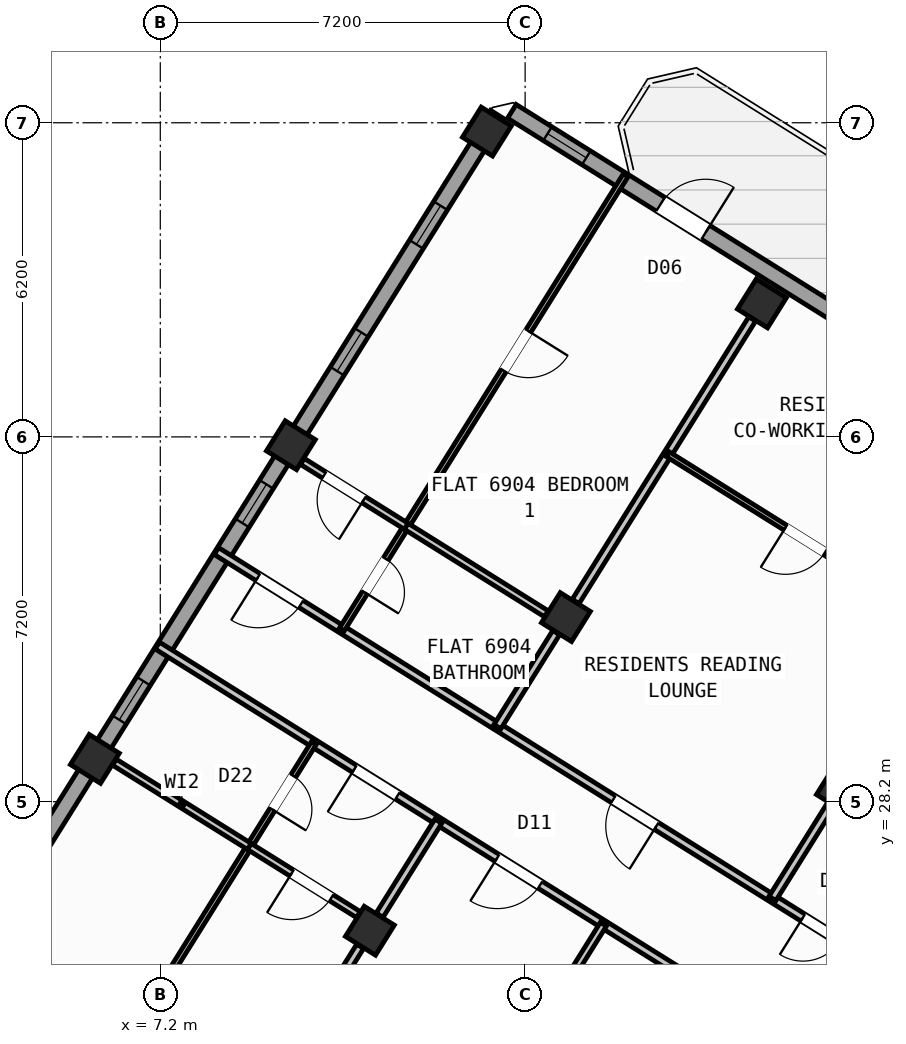
"""IFC4 building model, lengths in metres.
Left out: names, types, materials, properties, quantities, classifications, styles, units other than length and angle.
Written with IfcOpenShell. Run it as: python <this file> out.ifc"""

import sys

from ifc_helpers import new_model, si_unit, direction, frame, frame_2d, origin, origin_2d, place, context, subcontext, project, spatial, rectangle, hollow_rectangle, extrude, source, transform, mapped, element, fill, save


model = new_model("IFC4")
c1 = context("Model", 3, precision=1e-05, world=origin(), true_north=direction((0.0, 1.0)))
c2 = subcontext(c1, "Body", "Model", "MODEL_VIEW")
j1 = project(units=[si_unit("LENGTHUNIT", "METRE"), si_unit("PLANEANGLEUNIT", "RADIAN")], contexts=[c1])
p1 = place(None, origin())
s1 = spatial("IfcSite", under=j1, at=p1, CompositionType="ELEMENT")
p2 = place(p1, origin())
s2 = spatial("IfcBuilding", under=s1, at=p2, CompositionType="ELEMENT")
p3 = place(p2, frame((0.0, 0.0, 273.6)))
s3 = spatial("IfcBuildingStorey", under=s2, at=p3, CompositionType="ELEMENT", Elevation=273.6)
m1 = source(origin(), c2, "Body", "SweptSolid", [
    extrude(hollow_rectangle(XDim=0.7, YDim=0.7, WallThickness=0.028, at=origin_2d()), origin(), (0.0, 0.0, 1.0), 3.6),
])
for number, where, z_axis, x_axis in (
    (1, (20.632, 28.452, 0.0), (0.0, 0.0, 1.0), (-0.848, 0.53, 0.0)),
    (2, (19.073, 38.034, 0.0), (0.0, 0.0, 1.0), (-0.848, 0.53, 0.0)),
    (3, (15.205, 31.844, 0.0), (0.0, 0.0, 1.0), (-0.848, 0.53, 0.0)),
    (4, (11.336, 25.653, 0.0), (0.0, 0.0, 1.0), (-0.848, 0.53, 0.0)),
    (5, (13.646, 41.426, 0.0), (0.0, 0.0, 1.0), (-0.848, 0.53, 0.0)),
    (6, (9.777, 35.235, 0.0), (0.0, 0.0, 1.0), (-0.848, 0.53, 0.0)),
    (7, (5.909, 29.044, 0.0), (0.0, 0.0, 1.0), (-0.848, 0.53, 0.0)),
):
    element("IfcColumn", number, at=place(p3, frame(where, z_axis=z_axis, x_axis=x_axis)), inside=s3, PredefinedType="COLUMN", context=c2, shape_type="MappedRepresentation", body=[
        mapped(m1, transform((0.0, 0.0, 0.0), scale=1.0)),
    ])
p4 = place(p3, frame((2.415, 23.452, 0.0), z_axis=(0.0, 0.0, 1.0), x_axis=(0.52991049553, 0.848053575387, 0.0)))
e8 = element("IfcWall", 8, at=p4, inside=s3, PredefinedType="STANDARD", context=c2, shape_type="SweptSolid", body=[
    extrude(rectangle(XDim=21.587, YDim=0.32, at=frame_2d((10.794, 0.0))), origin(), (0.0, 0.0, 1.0), 2.875),
])
p5 = place(p4, frame((2.606, 0.0, 0.9)))
e9 = element("IfcOpeningElement", 9, at=p5, cuts=e8, PredefinedType="OPENING", context=c2, shape_type="SweptSolid", body=[
    extrude(rectangle(XDim=1.65, YDim=1.45, at=frame_2d((0.825, 0.725))), frame((0.0, 0.17, 0.0), z_axis=(0.0, -1.0, 0.0), x_axis=(1.0, 0.0, 0.0)), (0.0, 0.0, 1.0), 0.34),
])
p6 = place(p4, frame((7.504, 0.0, 1.0)))
e10 = element("IfcOpeningElement", 10, at=p6, cuts=e8, PredefinedType="OPENING", context=c2, shape_type="SweptSolid", body=[
    extrude(rectangle(XDim=0.9, YDim=1.25, at=frame_2d((0.45, 0.625))), frame((0.0, 0.17, 0.0), z_axis=(0.0, -1.0, 0.0), x_axis=(1.0, 0.0, 0.0)), (0.0, 0.0, 1.0), 0.34),
])
p7 = place(p4, frame((12.084, 0.0, 1.0)))
e11 = element("IfcOpeningElement", 11, at=p7, cuts=e8, PredefinedType="OPENING", context=c2, shape_type="SweptSolid", body=[
    extrude(rectangle(XDim=0.9, YDim=1.25, at=frame_2d((0.45, 0.625))), frame((0.0, 0.17, 0.0), z_axis=(0.0, -1.0, 0.0), x_axis=(1.0, 0.0, 0.0)), (0.0, 0.0, 1.0), 0.34),
])
p8 = place(p4, frame((15.619, 0.0, 1.0)))
e12 = element("IfcOpeningElement", 12, at=p8, cuts=e8, PredefinedType="OPENING", context=c2, shape_type="SweptSolid", body=[
    extrude(rectangle(XDim=0.9, YDim=1.25, at=frame_2d((0.45, 0.625))), frame((0.0, 0.17, 0.0), z_axis=(0.0, -1.0, 0.0), x_axis=(1.0, 0.0, 0.0)), (0.0, 0.0, 1.0), 0.34),
])
p9 = place(p4, frame((18.569, 0.0, 1.0)))
e13 = element("IfcOpeningElement", 13, at=p9, cuts=e8, PredefinedType="OPENING", context=c2, shape_type="SweptSolid", body=[
    extrude(rectangle(XDim=0.9, YDim=1.25, at=frame_2d((0.45, 0.625))), frame((0.0, 0.17, 0.0), z_axis=(0.0, -1.0, 0.0), x_axis=(1.0, 0.0, 0.0)), (0.0, 0.0, 1.0), 0.34),
])
p10 = place(p3, frame((14.138, 41.825, 0.0), z_axis=(0.0, 0.0, 1.0), x_axis=(0.848046498049, -0.529921821731, 0.0)))
e14 = element("IfcWall", 14, at=p10, inside=s3, PredefinedType="STANDARD", context=c2, shape_type="SweptSolid", body=[
    extrude(rectangle(XDim=31.588, YDim=0.32, at=frame_2d((15.794, 0.0))), origin(), (0.0, 0.0, 1.0), 3.35),
])
p11 = place(p10, frame((3.46, 0.0, 0.0)))
e15 = element("IfcOpeningElement", 15, at=p11, cuts=e14, PredefinedType="OPENING", context=c2, shape_type="SweptSolid", body=[
    extrude(rectangle(XDim=1.05, YDim=2.15, at=frame_2d((0.525, 1.075))), frame((0.0, 0.17, 0.0), z_axis=(0.0, -1.0, 0.0), x_axis=(1.0, 0.0, 0.0)), (0.0, 0.0, 1.0), 0.34),
])
p12 = place(p10, frame((0.831, 0.0, 1.0)))
e16 = element("IfcOpeningElement", 16, at=p12, cuts=e14, PredefinedType="OPENING", context=c2, shape_type="SweptSolid", body=[
    extrude(rectangle(XDim=0.9, YDim=1.25, at=frame_2d((0.45, 0.625))), frame((0.0, 0.17, 0.0), z_axis=(0.0, -1.0, 0.0), x_axis=(1.0, 0.0, 0.0)), (0.0, 0.0, 1.0), 0.34),
])
p13 = place(p10, frame((8.719, 0.0, 0.9)))
e17 = element("IfcOpeningElement", 17, at=p13, cuts=e14, PredefinedType="OPENING", context=c2, shape_type="SweptSolid", body=[
    extrude(rectangle(XDim=1.35, YDim=1.45, at=frame_2d((0.675, 0.725))), frame((0.0, 0.17, 0.0), z_axis=(0.0, -1.0, 0.0), x_axis=(1.0, 0.0, 0.0)), (0.0, 0.0, 1.0), 0.34),
])
p14 = place(p10, frame((13.599, 0.0, 0.95)))
e18 = element("IfcOpeningElement", 18, at=p14, cuts=e14, PredefinedType="OPENING", context=c2, shape_type="SweptSolid", body=[
    extrude(rectangle(XDim=1.95, YDim=1.35, at=frame_2d((0.975, 0.675))), frame((0.0, 0.17, 0.0), z_axis=(0.0, -1.0, 0.0), x_axis=(1.0, 0.0, 0.0)), (0.0, 0.0, 1.0), 0.34),
])
p15 = place(p10, frame((17.154, 0.0, 1.0)))
e19 = element("IfcOpeningElement", 19, at=p15, cuts=e14, PredefinedType="OPENING", context=c2, shape_type="SweptSolid", body=[
    extrude(rectangle(XDim=0.9, YDim=1.25, at=frame_2d((0.45, 0.625))), frame((0.0, 0.17, 0.0), z_axis=(0.0, -1.0, 0.0), x_axis=(1.0, 0.0, 0.0)), (0.0, 0.0, 1.0), 0.34),
])
p16 = place(p10, frame((21.719, 0.0, 0.9)))
e20 = element("IfcOpeningElement", 20, at=p16, cuts=e14, PredefinedType="OPENING", context=c2, shape_type="SweptSolid", body=[
    extrude(rectangle(XDim=1.65, YDim=1.45, at=frame_2d((0.825, 0.725))), frame((0.0, 0.17, 0.0), z_axis=(0.0, -1.0, 0.0), x_axis=(1.0, 0.0, 0.0)), (0.0, 0.0, 1.0), 0.34),
])
p17 = place(p10, frame((27.419, 0.0, 0.9)))
e21 = element("IfcOpeningElement", 21, at=p17, cuts=e14, PredefinedType="OPENING", context=c2, shape_type="SweptSolid", body=[
    extrude(rectangle(XDim=1.65, YDim=1.45, at=frame_2d((0.825, 0.725))), frame((0.0, 0.17, 0.0), z_axis=(0.0, -1.0, 0.0), x_axis=(1.0, 0.0, 0.0)), (0.0, 0.0, 1.0), 0.34),
])
p18 = place(p3, frame((22.495, 24.281, 0.0), z_axis=(0.0, 0.0, 1.0), x_axis=(-0.848052408131, 0.529912363569, 0.0)))
e22 = element("IfcWall", 22, at=p18, inside=s3, PredefinedType="PARTITIONING", context=c2, shape_type="SweptSolid", body=[
    extrude(rectangle(XDim=16.73, YDim=0.16, at=frame_2d((8.365, 0.0))), origin(), (0.0, 0.0, 1.0), 3.34),
])
p19 = place(p18, frame((2.22, 0.0, 0.0)))
e23 = element("IfcOpeningElement", 23, at=p19, cuts=e22, PredefinedType="OPENING", context=c2, shape_type="SweptSolid", body=[
    extrude(rectangle(XDim=0.86, YDim=2.05, at=frame_2d((0.43, 1.025))), frame((0.0, 0.09, 0.0), z_axis=(0.0, -1.0, 0.0), x_axis=(1.0, 0.0, 0.0)), (0.0, 0.0, 1.0), 0.18),
])
p20 = place(p18, frame((6.49, 0.0, 0.0)))
e24 = element("IfcOpeningElement", 24, at=p20, cuts=e22, PredefinedType="OPENING", context=c2, shape_type="SweptSolid", body=[
    extrude(rectangle(XDim=1.0, YDim=2.1, at=frame_2d((0.5, 1.05))), frame((0.0, 0.09, 0.0), z_axis=(0.0, -1.0, 0.0), x_axis=(1.0, 0.0, 0.0)), (0.0, 0.0, 1.0), 0.18),
])
p21 = place(p18, frame((14.76, 0.0, 0.0)))
e25 = element("IfcOpeningElement", 25, at=p21, cuts=e22, PredefinedType="OPENING", context=c2, shape_type="SweptSolid", body=[
    extrude(rectangle(XDim=1.0, YDim=2.1, at=frame_2d((0.5, 1.05))), frame((0.0, 0.09, 0.0), z_axis=(0.0, -1.0, 0.0), x_axis=(1.0, 0.0, 0.0)), (0.0, 0.0, 1.0), 0.18),
])
p22 = place(p3, frame((21.329, 22.416, 0.0), z_axis=(0.0, 0.0, 1.0), x_axis=(-0.848052408131, 0.529912363569, 0.0)))
e26 = element("IfcWall", 26, at=p22, inside=s3, PredefinedType="PARTITIONING", context=c2, shape_type="SweptSolid", body=[
    extrude(rectangle(XDim=16.73, YDim=0.16, at=frame_2d((8.365, 0.0))), origin(), (0.0, 0.0, 1.0), 3.34),
])
p23 = place(p22, frame((1.395, 0.0, 0.0)))
e27 = element("IfcOpeningElement", 27, at=p23, cuts=e26, PredefinedType="OPENING", context=c2, shape_type="SweptSolid", body=[
    extrude(rectangle(XDim=1.0, YDim=2.1, at=frame_2d((0.5, 1.05))), frame((0.0, 0.09, 0.0), z_axis=(0.0, -1.0, 0.0), x_axis=(1.0, 0.0, 0.0)), (0.0, 0.0, 1.0), 0.18),
])
p24 = place(p22, frame((7.82, 0.0, 0.0)))
e28 = element("IfcOpeningElement", 28, at=p24, cuts=e26, PredefinedType="OPENING", context=c2, shape_type="SweptSolid", body=[
    extrude(rectangle(XDim=1.0, YDim=2.1, at=frame_2d((0.5, 1.05))), frame((0.0, 0.09, 0.0), z_axis=(0.0, -1.0, 0.0), x_axis=(1.0, 0.0, 0.0)), (0.0, 0.0, 1.0), 0.18),
])
p25 = place(p22, frame((11.14, 0.0, 0.0)))
e29 = element("IfcOpeningElement", 29, at=p25, cuts=e26, PredefinedType="OPENING", context=c2, shape_type="SweptSolid", body=[
    extrude(rectangle(XDim=1.0, YDim=2.1, at=frame_2d((0.5, 1.05))), frame((0.0, 0.09, 0.0), z_axis=(0.0, -1.0, 0.0), x_axis=(1.0, 0.0, 0.0)), (0.0, 0.0, 1.0), 0.18),
])
p26 = place(p3, frame((12.688, 27.815, 0.0), z_axis=(0.0, 0.0, 1.0), x_axis=(-0.52994879608, -0.848029641896, 0.0)))
e30 = element("IfcWall", 30, at=p26, inside=s3, PredefinedType="PARTITIONING", context=c2, shape_type="SweptSolid", body=[
    extrude(rectangle(XDim=2.188, YDim=0.16, at=frame_2d((1.094, 0.0))), origin(), (0.0, 0.0, 1.0), 2.875),
])
p27 = place(p3, frame((11.144, 25.346, 0.0), z_axis=(0.0, 0.0, 1.0), x_axis=(-0.529904903214, -0.848057069748, 0.0)))
e31 = element("IfcWall", 31, at=p27, inside=s3, PredefinedType="PARTITIONING", context=c2, shape_type="SweptSolid", body=[
    extrude(rectangle(XDim=5.601, YDim=0.16, at=frame_2d((2.801, 0.0))), origin(), (0.0, 0.0, 1.0), 2.875),
])
p28 = place(p3, frame((15.944, 25.781, 0.0), z_axis=(0.0, 0.0, 1.0), x_axis=(-0.529917480809, -0.848049210561, 0.0)))
e32 = element("IfcWall", 32, at=p28, inside=s3, PredefinedType="PLUMBINGWALL", context=c2, shape_type="SweptSolid", body=[
    extrude(rectangle(XDim=4.58, YDim=0.14, at=frame_2d((2.29, 0.0))), origin(), (0.0, 0.0, 1.0), 3.34),
])
p29 = place(p28, frame((1.9, 0.0, 0.0)))
e33 = element("IfcOpeningElement", 33, at=p29, cuts=e32, PredefinedType="OPENING", context=c2, shape_type="SweptSolid", body=[
    extrude(rectangle(XDim=0.78, YDim=2.05, at=frame_2d((0.39, 1.025))), frame((0.0, 0.08, 0.0), z_axis=(0.0, -1.0, 0.0), x_axis=(1.0, 0.0, 0.0)), (0.0, 0.0, 1.0), 0.16),
])
p30 = place(p3, frame((10.228, 29.352, 0.0), z_axis=(0.0, 0.0, 1.0), x_axis=(-0.529917830441, -0.848048992088, 0.0)))
e34 = element("IfcWall", 34, at=p30, inside=s3, PredefinedType="PARTITIONING", context=c2, shape_type="SweptSolid", body=[
    extrude(rectangle(XDim=9.47, YDim=0.11, at=frame_2d((4.735, 0.0))), origin(), (0.0, 0.0, 1.0), 3.34),
])
p31 = place(p30, frame((0.76, 0.0, 0.0)))
e35 = element("IfcOpeningElement", 35, at=p31, cuts=e34, PredefinedType="OPENING", context=c2, shape_type="SweptSolid", body=[
    extrude(rectangle(XDim=0.78, YDim=2.05, at=frame_2d((0.39, 1.025))), frame((0.0, 0.065, 0.0), z_axis=(0.0, -1.0, 0.0), x_axis=(1.0, 0.0, 0.0)), (0.0, 0.0, 1.0), 0.13),
])
p32 = place(p30, frame((5.475, 0.0, 0.0)))
e36 = element("IfcOpeningElement", 36, at=p32, cuts=e34, PredefinedType="OPENING", context=c2, shape_type="SweptSolid", body=[
    extrude(rectangle(XDim=0.92, YDim=2.08, at=frame_2d((0.46, 1.04))), frame((0.0, 0.065, 0.0), z_axis=(0.0, -1.0, 0.0), x_axis=(1.0, 0.0, 0.0)), (0.0, 0.0, 1.0), 0.13),
])
p33 = place(p3, frame((11.109, 25.972, 0.0), z_axis=(0.0, 0.0, 1.0), x_axis=(-0.848041534199, 0.529929765415, 0.0)))
e37 = element("IfcWall", 37, at=p33, inside=s3, PredefinedType="PLUMBINGWALL", context=c2, shape_type="SweptSolid", body=[
    extrude(rectangle(XDim=2.538, YDim=0.14, at=frame_2d((1.269, 0.0))), origin(), (0.0, 0.0, 1.0), 2.875),
])
p34 = place(p33, frame((0.628, 0.0, 0.0)))
e38 = element("IfcOpeningElement", 38, at=p34, cuts=e37, PredefinedType="OPENING", context=c2, shape_type="SweptSolid", body=[
    extrude(rectangle(XDim=0.92, YDim=2.08, at=frame_2d((0.46, 1.04))), frame((0.0, 0.08, 0.0), z_axis=(0.0, -1.0, 0.0), x_axis=(1.0, 0.0, 0.0)), (0.0, 0.0, 1.0), 0.16),
])
p35 = place(p3, frame((8.956, 27.317, 0.0), z_axis=(0.0, 0.0, 1.0), x_axis=(-0.848050751193, 0.529915015264, 0.0)))
e39 = element("IfcWall", 39, at=p35, inside=s3, PredefinedType="PLUMBINGWALL", context=c2, shape_type="SweptSolid", body=[
    extrude(rectangle(XDim=3.138, YDim=0.14, at=frame_2d((1.569, 0.0))), origin(), (0.0, 0.0, 1.0), 2.875),
])
p36 = place(p3, frame((20.44, 28.145, 0.0), z_axis=(0.0, 0.0, 1.0), x_axis=(-0.5299186965, -0.848048450915, 0.0)))
e40 = element("IfcWall", 40, at=p36, inside=s3, PredefinedType="PARTITIONING", context=c2, shape_type="SweptSolid", body=[
    extrude(rectangle(XDim=2.188, YDim=0.16, at=frame_2d((1.094, 0.0))), origin(), (0.0, 0.0, 1.0), 2.875),
])
p37 = place(p3, frame((18.881, 37.727, 0.0), z_axis=(0.0, 0.0, 1.0), x_axis=(-0.529938869374, -0.84803584519, 0.0)))
e41 = element("IfcWall", 41, at=p37, inside=s3, PredefinedType="PARTITIONING", context=c2, shape_type="SweptSolid", body=[
    extrude(rectangle(XDim=6.576, YDim=0.16, at=frame_2d((3.288, 0.0))), origin(), (0.0, 0.0, 1.0), 2.875),
])
p38 = place(p3, frame((15.013, 31.537, 0.0), z_axis=(0.0, 0.0, 1.0), x_axis=(-0.5299186965, -0.848048450915, 0.0)))
e42 = element("IfcWall", 42, at=p38, inside=s3, PredefinedType="PARTITIONING", context=c2, shape_type="SweptSolid", body=[
    extrude(rectangle(XDim=2.188, YDim=0.16, at=frame_2d((1.094, 0.0))), origin(), (0.0, 0.0, 1.0), 2.875),
])
p39 = place(p3, frame((22.642, 31.668, 0.0), z_axis=(0.0, 0.0, 1.0), x_axis=(-0.84806687439, 0.529889211593, 0.0)))
e43 = element("IfcWall", 43, at=p39, inside=s3, PredefinedType="PARTITIONING", context=c2, shape_type="SweptSolid", body=[
    extrude(rectangle(XDim=6.4, YDim=0.11, at=frame_2d((3.2, 0.0))), origin(), (0.0, 0.0, 1.0), 3.34),
])
p40 = place(p39, frame((2.74, 0.0, 0.0)))
e44 = element("IfcOpeningElement", 44, at=p40, cuts=e43, PredefinedType="OPENING", context=c2, shape_type="SweptSolid", body=[
    extrude(rectangle(XDim=0.92, YDim=2.08, at=frame_2d((0.46, 1.04))), frame((0.0, 0.065, 0.0), z_axis=(0.0, -1.0, 0.0), x_axis=(1.0, 0.0, 0.0)), (0.0, 0.0, 1.0), 0.13),
])
p41 = place(p3, frame((16.385, 40.563, 0.0), z_axis=(0.0, 0.0, 1.0), x_axis=(-0.529924195719, -0.848045014602, 0.0)))
e45 = element("IfcWall", 45, at=p41, inside=s3, PredefinedType="PARTITIONING", context=c2, shape_type="SweptSolid", body=[
    extrude(rectangle(XDim=10.57, YDim=0.11, at=frame_2d((5.285, 0.0))), origin(), (0.0, 0.0, 1.0), 3.34),
])
p42 = place(p41, frame((8.93, 0.0, 0.0)))
e46 = element("IfcOpeningElement", 46, at=p42, cuts=e45, PredefinedType="OPENING", context=c2, shape_type="SweptSolid", body=[
    extrude(rectangle(XDim=0.78, YDim=2.05, at=frame_2d((0.39, 1.025))), frame((0.0, 0.065, 0.0), z_axis=(0.0, -1.0, 0.0), x_axis=(1.0, 0.0, 0.0)), (0.0, 0.0, 1.0), 0.13),
])
p43 = place(p41, frame((3.625, 0.0, 0.0)))
e47 = element("IfcOpeningElement", 47, at=p43, cuts=e45, PredefinedType="OPENING", context=c2, shape_type="SweptSolid", body=[
    extrude(rectangle(XDim=0.92, YDim=2.08, at=frame_2d((0.46, 1.04))), frame((0.0, 0.065, 0.0), z_axis=(0.0, -1.0, 0.0), x_axis=(1.0, 0.0, 0.0)), (0.0, 0.0, 1.0), 0.13),
])
p44 = place(p3, frame((12.055, 33.635, 0.0), z_axis=(0.0, 0.0, 1.0), x_axis=(-0.848089044815, 0.529853727046, 0.0)))
e48 = element("IfcWall", 48, at=p44, inside=s3, PredefinedType="PLUMBINGWALL", context=c2, shape_type="SweptSolid", body=[
    extrude(rectangle(XDim=2.418, YDim=0.14, at=frame_2d((1.209, 0.0))), origin(), (0.0, 0.0, 1.0), 2.875),
])
p45 = place(p44, frame((0.99, 0.0, 0.0)))
e49 = element("IfcOpeningElement", 49, at=p45, cuts=e48, PredefinedType="OPENING", context=c2, shape_type="SweptSolid", body=[
    extrude(rectangle(XDim=0.92, YDim=2.08, at=frame_2d((0.46, 1.04))), frame((0.0, 0.08, 0.0), z_axis=(0.0, -1.0, 0.0), x_axis=(1.0, 0.0, 0.0)), (0.0, 0.0, 1.0), 0.16),
])
p46 = place(p3, frame((14.818, 31.908, 0.0), z_axis=(0.0, 0.0, 1.0), x_axis=(-0.848036190178, 0.529938317305, 0.0)))
e50 = element("IfcWall", 50, at=p46, inside=s3, PredefinedType="PLUMBINGWALL", context=c2, shape_type="SweptSolid", body=[
    extrude(rectangle(XDim=3.258, YDim=0.14, at=frame_2d((1.629, 0.0))), origin(), (0.0, 0.0, 1.0), 2.875),
])
m2 = source(origin(), c2, "Body", "SweptSolid", [
    extrude(rectangle(XDim=1.05, YDim=2.15, at=frame_2d((0.525, 1.075))), frame((0.0, 0.025, 0.0), z_axis=(0.0, -1.0, 0.0), x_axis=(1.0, 0.0, 0.0)), (0.0, 0.0, 1.0), 0.05),
])
p47 = place(p11, origin())
e51 = element("IfcDoor", 51, at=p47, inside=s3, OperationType="SINGLE_SWING_RIGHT", PredefinedType="DOOR", context=c2, shape_type="MappedRepresentation", body=[
    mapped(m2, transform((0.0, 0.0, 0.0), scale=1.0)),
])
fill(e15, e51)
m3 = source(origin(), c2, "Body", "SweptSolid", [
    extrude(rectangle(XDim=0.9, YDim=1.25, at=frame_2d((0.45, 0.625))), frame((0.0, 0.03, 0.0), z_axis=(0.0, -1.0, 0.0), x_axis=(1.0, 0.0, 0.0)), (0.0, 0.0, 1.0), 0.06),
])
p48 = place(p6, origin())
e52 = element("IfcWindow", 52, at=p48, inside=s3, PartitioningType="SINGLE_PANEL", PredefinedType="WINDOW", context=c2, shape_type="MappedRepresentation", body=[
    mapped(m3, transform((0.0, 0.0, 0.0), scale=1.0)),
])
fill(e10, e52)
p49 = place(p7, origin())
e53 = element("IfcWindow", 53, at=p49, inside=s3, PartitioningType="SINGLE_PANEL", PredefinedType="WINDOW", context=c2, shape_type="MappedRepresentation", body=[
    mapped(m3, transform((0.0, 0.0, 0.0), scale=1.0)),
])
fill(e11, e53)
p50 = place(p8, origin())
e54 = element("IfcWindow", 54, at=p50, inside=s3, PartitioningType="SINGLE_PANEL", PredefinedType="WINDOW", context=c2, shape_type="MappedRepresentation", body=[
    mapped(m3, transform((0.0, 0.0, 0.0), scale=1.0)),
])
fill(e12, e54)
p51 = place(p9, origin())
e55 = element("IfcWindow", 55, at=p51, inside=s3, PartitioningType="SINGLE_PANEL", PredefinedType="WINDOW", context=c2, shape_type="MappedRepresentation", body=[
    mapped(m3, transform((0.0, 0.0, 0.0), scale=1.0)),
])
fill(e13, e55)
p52 = place(p12, origin())
e56 = element("IfcWindow", 56, at=p52, inside=s3, PartitioningType="SINGLE_PANEL", PredefinedType="WINDOW", context=c2, shape_type="MappedRepresentation", body=[
    mapped(m3, transform((0.0, 0.0, 0.0), scale=1.0)),
])
fill(e16, e56)
m4 = source(origin(), c2, "Body", "SweptSolid", [
    extrude(rectangle(XDim=1.0, YDim=2.1, at=frame_2d((0.5, 1.05))), frame((0.0, 0.025, 0.0), z_axis=(0.0, -1.0, 0.0), x_axis=(1.0, 0.0, 0.0)), (0.0, 0.0, 1.0), 0.05),
])
p53 = place(p24, origin())
e57 = element("IfcDoor", 57, at=p53, inside=s3, OperationType="SINGLE_SWING_RIGHT", PredefinedType="DOOR", context=c2, shape_type="MappedRepresentation", body=[
    mapped(m4, transform((0.0, 0.0, 0.0), scale=1.0)),
])
fill(e28, e57)
p54 = place(p25, origin())
e58 = element("IfcDoor", 58, at=p54, inside=s3, OperationType="SINGLE_SWING_RIGHT", PredefinedType="DOOR", context=c2, shape_type="MappedRepresentation", body=[
    mapped(m4, transform((0.0, 0.0, 0.0), scale=1.0)),
])
fill(e29, e58)
m5 = source(origin(), c2, "Body", "SweptSolid", [
    extrude(rectangle(XDim=0.92, YDim=2.08, at=frame_2d((0.46, 1.04))), frame((0.0, 0.025, 0.0), z_axis=(0.0, -1.0, 0.0), x_axis=(1.0, 0.0, 0.0)), (0.0, 0.0, 1.0), 0.05),
])
p55 = place(p34, origin())
e59 = element("IfcDoor", 59, at=p55, inside=s3, OperationType="SINGLE_SWING_RIGHT", PredefinedType="DOOR", context=c2, shape_type="MappedRepresentation", body=[
    mapped(m5, transform((0.0, 0.0, 0.0), scale=1.0)),
])
fill(e38, e59)
m6 = source(origin(), c2, "Body", "SweptSolid", [
    extrude(rectangle(XDim=0.78, YDim=2.05, at=frame_2d((0.39, 1.025))), frame((0.0, 0.025, 0.0), z_axis=(0.0, -1.0, 0.0), x_axis=(1.0, 0.0, 0.0)), (0.0, 0.0, 1.0), 0.05),
])
p56 = place(p31, origin())
e60 = element("IfcDoor", 60, at=p56, inside=s3, OperationType="SINGLE_SWING_RIGHT", PredefinedType="DOOR", context=c2, shape_type="MappedRepresentation", body=[
    mapped(m6, transform((0.0, 0.0, 0.0), scale=1.0)),
])
fill(e35, e60)
m7 = source(origin(), c2, "Body", "SweptSolid", [
    extrude(rectangle(XDim=0.86, YDim=2.05, at=frame_2d((0.43, 1.025))), frame((0.0, 0.025, 0.0), z_axis=(0.0, -1.0, 0.0), x_axis=(1.0, 0.0, 0.0)), (0.0, 0.0, 1.0), 0.05),
])
p57 = place(p19, origin())
e61 = element("IfcDoor", 61, at=p57, inside=s3, OperationType="SINGLE_SWING_RIGHT", PredefinedType="DOOR", context=c2, shape_type="MappedRepresentation", body=[
    mapped(m7, transform((0.0, 0.0, 0.0), scale=1.0)),
])
fill(e23, e61)
p58 = place(p20, origin())
e62 = element("IfcDoor", 62, at=p58, inside=s3, OperationType="SINGLE_SWING_LEFT", PredefinedType="DOOR", context=c2, shape_type="MappedRepresentation", body=[
    mapped(m4, transform((0.0, 0.0, 0.0), scale=1.0)),
])
fill(e24, e62)
p59 = place(p40, origin())
e63 = element("IfcDoor", 63, at=p59, inside=s3, OperationType="SINGLE_SWING_RIGHT", PredefinedType="DOOR", context=c2, shape_type="MappedRepresentation", body=[
    mapped(m5, transform((0.0, 0.0, 0.0), scale=1.0)),
])
fill(e44, e63)
p60 = place(p21, origin())
e64 = element("IfcDoor", 64, at=p60, inside=s3, OperationType="SINGLE_SWING_RIGHT", PredefinedType="DOOR", context=c2, shape_type="MappedRepresentation", body=[
    mapped(m4, transform((0.0, 0.0, 0.0), scale=1.0)),
])
fill(e25, e64)
p61 = place(p45, origin())
e65 = element("IfcDoor", 65, at=p61, inside=s3, OperationType="SINGLE_SWING_LEFT", PredefinedType="DOOR", context=c2, shape_type="MappedRepresentation", body=[
    mapped(m5, transform((0.0, 0.0, 0.0), scale=1.0)),
])
fill(e49, e65)
p62 = place(p42, origin())
e66 = element("IfcDoor", 66, at=p62, inside=s3, OperationType="SINGLE_SWING_RIGHT", PredefinedType="DOOR", context=c2, shape_type="MappedRepresentation", body=[
    mapped(m6, transform((0.0, 0.0, 0.0), scale=1.0)),
])
fill(e46, e66)
p63 = place(p43, origin())
e67 = element("IfcDoor", 67, at=p63, inside=s3, OperationType="SINGLE_SWING_LEFT", PredefinedType="DOOR", context=c2, shape_type="MappedRepresentation", body=[
    mapped(m5, transform((0.0, 0.0, 0.0), scale=1.0)),
])
fill(e47, e67)
save(model, sys.argv[1])
